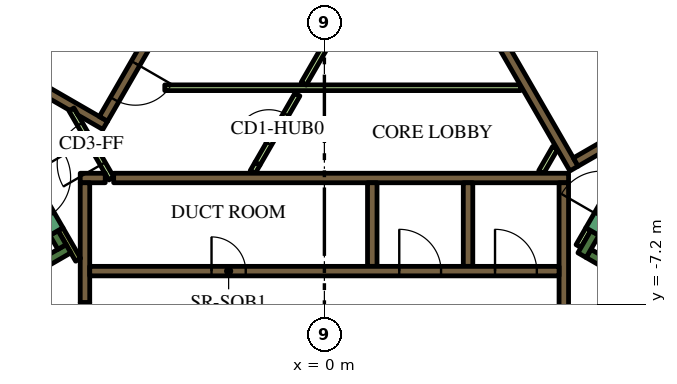
"""IFC4 building model, lengths in metres.
Left out: names, types, materials, properties, quantities, classifications, styles, units other than length and angle.
Written with IfcOpenShell. Run it as: python <this file> out.ifc"""

import sys

from ifc_helpers import new_model, si_unit, direction, frame, frame_2d, origin, place, context, subcontext, project, spatial, polyline, rectangle, outline, extrude, element, fill, save


model = new_model("IFC4")
c1 = context("Model", 3, precision=1e-05, world=origin(), true_north=direction((0.0, 1.0)))
c2 = subcontext(c1, "Body", "Model", "MODEL_VIEW")
j1 = project(units=[si_unit("LENGTHUNIT", "METRE"), si_unit("PLANEANGLEUNIT", "RADIAN")], contexts=[c1])
p1 = place(None, origin())
s1 = spatial("IfcSite", under=j1, at=p1, CompositionType="ELEMENT")
p2 = place(p1, origin())
s2 = spatial("IfcBuilding", under=s1, at=p2, CompositionType="ELEMENT")
p3 = place(p2, frame((0.0, 0.0, 95.4)))
s3 = spatial("IfcBuildingStorey", under=s2, at=p3, CompositionType="ELEMENT", Elevation=95.4)
p4 = place(p3, frame((6.776, 13.364, 0.0), z_axis=(0.0, 0.0, 1.0), x_axis=(0.500004177138, -0.8660229921, 0.0)))
e1 = element("IfcWall", 1, at=p4, inside=s3, PredefinedType="SOLIDWALL", context=c2, shape_type="SweptSolid", body=[
    extrude(rectangle(XDim=20.204, YDim=0.9, at=frame_2d((10.102, 0.0))), origin(), (0.0, 0.0, 1.0), 3.9),
])
p5 = place(p3, frame((-15.36, -1.503, 0.0), z_axis=(0.0, 0.0, 1.0), x_axis=(0.50000389221, 0.866023156604, 0.0)))
e2 = element("IfcWall", 2, at=p5, inside=s3, PredefinedType="SOLIDWALL", context=c2, shape_type="SweptSolid", body=[
    extrude(rectangle(XDim=21.0, YDim=0.9, at=frame_2d((10.5, 0.0))), origin(), (0.0, 0.0, 1.0), 3.9),
])
p6 = place(p3, frame((12.84, -9.261, 0.0), z_axis=(0.0, 0.0, 1.0), x_axis=(-0.866013990052, 0.500019768644, 0.0)))
e3 = element("IfcWall", 3, at=p6, inside=s3, PredefinedType="SOLIDWALL", context=c2, shape_type="SweptSolid", body=[
    extrude(rectangle(XDim=6.8, YDim=0.25, at=frame_2d((3.4, 0.0))), origin(), (0.0, 0.0, 1.0), 3.9),
])
p7 = place(p3, frame((6.78, -5.906, 0.0), z_axis=(0.0, 0.0, 1.0), x_axis=(0.500223362819, 0.865896406789, 0.0)))
e4 = element("IfcWall", 4, at=p7, inside=s3, PredefinedType="SOLIDWALL", context=c2, shape_type="SweptSolid", body=[
    extrude(rectangle(XDim=0.675, YDim=0.25, at=frame_2d((0.337, 0.0))), origin(), (0.0, 0.0, 1.0), 3.9),
])
p8 = place(p3, frame((-12.84, -9.261, 0.0), z_axis=(0.0, 0.0, 1.0), x_axis=(0.866016039709, 0.500016218704, 0.0)))
e5 = element("IfcWall", 5, at=p8, inside=s3, PredefinedType="SOLIDWALL", context=c2, shape_type="SweptSolid", body=[
    extrude(rectangle(XDim=7.05, YDim=0.25, at=frame_2d((3.525, 0.0))), origin(), (0.0, 0.0, 1.0), 3.9),
])
p9 = place(p3, frame((-6.905, -5.69, 0.0), z_axis=(0.0, 0.0, 1.0), x_axis=(-0.500402024738, 0.865793170242, 0.0)))
e6 = element("IfcWall", 6, at=p9, inside=s3, PredefinedType="SOLIDWALL", context=c2, shape_type="SweptSolid", body=[
    extrude(rectangle(XDim=0.425, YDim=0.25, at=frame_2d((0.212, 0.0))), origin(), (0.0, 0.0, 1.0), 3.9),
])
p10 = place(p3, frame((-5.545, -3.875, 0.0), z_axis=(0.0, 0.0, 1.0), x_axis=(1.0, 0.0, 0.0)))
e7 = element("IfcWall", 7, at=p10, inside=s3, PredefinedType="SOLIDWALL", context=c2, shape_type="SweptSolid", body=[
    extrude(rectangle(XDim=11.97, YDim=0.25, at=frame_2d((5.985, 0.0))), origin(), (0.0, 0.0, 1.0), 3.9),
])
p11 = place(p3, frame((-6.425, -3.875, 0.0), z_axis=(0.0, 0.0, 1.0), x_axis=(1.0, 0.0, 0.0)))
e8 = element("IfcWall", 8, at=p11, inside=s3, PredefinedType="SOLIDWALL", context=c2, shape_type="SweptSolid", body=[
    extrude(rectangle(XDim=0.658, YDim=0.25, at=frame_2d((0.329, 0.0))), origin(), (0.0, 0.0, 1.0), 3.9),
])
p12 = place(p3, frame((6.3, -7.268, 0.0), z_axis=(0.0, 0.0, 1.0), x_axis=(0.0, 1.0, 0.0)))
e9 = element("IfcWall", 9, at=p12, inside=s3, PredefinedType="SOLIDWALL", context=c2, shape_type="SweptSolid", body=[
    extrude(rectangle(XDim=3.268, YDim=0.25, at=frame_2d((1.634, 0.0))), origin(), (0.0, 0.0, 1.0), 3.9),
])
for number, where, z_axis, x_axis in (
    (10, (3.78, -4.0, 0.0), (0.0, 0.0, 1.0), (0.0, -1.0, 0.0)),
    (11, (1.26, -4.0, 0.0), (0.0, 0.0, 1.0), (0.0, -1.0, 0.0)),
):
    element("IfcWall", number, at=place(p3, frame(where, z_axis=z_axis, x_axis=x_axis)), inside=s3, PredefinedType="SOLIDWALL", context=c2, shape_type="SweptSolid", body=[
        extrude(rectangle(XDim=2.2, YDim=0.25, at=frame_2d((1.1, 0.0))), origin(), (0.0, 0.0, 1.0), 3.9),
    ])
p13 = place(p3, frame((-6.3, -4.0, 0.0), z_axis=(0.0, 0.0, 1.0), x_axis=(0.0, -1.0, 0.0)))
e12 = element("IfcWall", 12, at=p13, inside=s3, PredefinedType="SOLIDWALL", context=c2, shape_type="SweptSolid", body=[
    extrude(rectangle(XDim=3.154, YDim=0.25, at=frame_2d((1.577, 0.0))), origin(), (0.0, 0.0, 1.0), 3.9),
])
p14 = place(p3, origin())
e13 = element("IfcWall", 13, at=p14, inside=s3, PredefinedType="SOLIDWALL", context=c2, shape_type="SweptSolid", body=[
    extrude(outline(polyline([(0.566, 6.725), (0.566, 6.875), (0.566, 6.875), (0.565, 6.875), (0.361, 6.875), (0.035, 7.439), (0.252, 7.564), (0.377, 7.348), (6.552, -3.348), (6.677, -3.564), (6.46, -3.689), (0.448, 6.725), (0.565, 6.725), (0.566, 6.725), (0.566, 6.725)])), origin(), (0.0, 0.0, 1.0), 3.9),
])
p15 = place(p3, frame((6.614, -3.456, 0.0), z_axis=(0.0, 0.0, 1.0), x_axis=(0.866031582473, 0.499989298045, 0.0)))
e14 = element("IfcWall", 14, at=p15, inside=s3, PredefinedType="SOLIDWALL", context=c2, shape_type="SweptSolid", body=[
    extrude(rectangle(XDim=2.455, YDim=0.25, at=frame_2d((1.228, 0.0))), origin(), (0.0, 0.0, 1.0), 3.9),
])
p16 = place(p3, frame((-8.06, -1.311, 0.0), z_axis=(0.0, 0.0, 1.0), x_axis=(0.50000273126, 0.866023826885, 0.0)))
e15 = element("IfcWall", 15, at=p16, inside=s3, PredefinedType="SOLIDWALL", context=c2, shape_type="SweptSolid", body=[
    extrude(rectangle(XDim=10.33, YDim=0.25, at=frame_2d((5.165, 0.0))), origin(), (0.0, 0.0, 1.0), 3.9),
])
e16 = element("IfcWall", 16, at=p14, inside=s3, PredefinedType="SOLIDWALL", context=c2, shape_type="SweptSolid", body=[
    extrude(outline(polyline([(-5.922, -2.257), (-5.922, -2.257), (-5.705, -2.382), (-5.83, -2.598), (-6.483, -2.221), (-6.591, -2.033), (-6.591, -2.033), (-6.7, -2.096), (-7.952, -1.373), (-7.827, -1.156), (-5.922, -2.257)])), origin(), (0.0, 0.0, 1.0), 3.9),
])
p17 = place(p3, frame((-6.48, -6.027, 0.0), z_axis=(0.0, 0.0, 1.0), x_axis=(-0.499927229454, 0.866067413802, 0.0)))
e17 = element("IfcWall", 17, at=p17, inside=s3, PredefinedType="PARTITIONING", context=c2, shape_type="SweptSolid", body=[
    extrude(rectangle(XDim=0.929, YDim=0.15, at=frame_2d((0.464, 0.0))), origin(), (0.0, 0.0, 1.0), 3.9),
])
p18 = place(p3, frame((-1.887, -3.718, 0.0), z_axis=(0.0, 0.0, 1.0), x_axis=(0.500165633897, 0.865929753888, 0.0)))
e18 = element("IfcWall", 18, at=p18, inside=s3, PredefinedType="PARTITIONING", context=c2, shape_type="SweptSolid", body=[
    extrude(rectangle(XDim=0.254, YDim=0.15, at=frame_2d((0.127, 0.0))), origin(), (0.0, 0.0, 1.0), 2.75),
])
p19 = place(p3, frame((6.945, -5.222, 0.0), z_axis=(0.0, 0.0, 1.0), x_axis=(-0.499818422106, -0.866130212453, 0.0)))
e19 = element("IfcWall", 19, at=p19, inside=s3, PredefinedType="PARTITIONING", context=c2, shape_type="SweptSolid", body=[
    extrude(rectangle(XDim=0.514, YDim=0.15, at=frame_2d((0.257, 0.0))), origin(), (0.0, 0.0, 1.0), 2.75),
])
p20 = place(p3, frame((5.705, -3.718, 0.0), z_axis=(0.0, 0.0, 1.0), x_axis=(0.499962090823, 0.866047289552, 0.0)))
e20 = element("IfcWall", 20, at=p20, inside=s3, PredefinedType="PARTITIONING", context=c2, shape_type="SweptSolid", body=[
    extrude(rectangle(XDim=0.735, YDim=0.15, at=frame_2d((0.367, 0.0))), origin(), (0.0, 0.0, 1.0), 2.75),
])
p21 = place(p3, frame((-4.2, -1.5, 0.0), z_axis=(0.0, 0.0, 1.0), x_axis=(1.0, 0.0, 0.0)))
e21 = element("IfcWall", 21, at=p21, inside=s3, PredefinedType="PARTITIONING", context=c2, shape_type="SweptSolid", body=[
    extrude(rectangle(XDim=9.359, YDim=0.15, at=frame_2d((4.68, 0.0))), origin(), (0.0, 0.0, 1.0), 2.75),
])
p22 = place(p3, frame((-0.544, -1.393, 0.0), z_axis=(0.0, 0.0, 1.0), x_axis=(0.499928740635, 0.866066541489, 0.0)))
e22 = element("IfcWall", 22, at=p22, inside=s3, PredefinedType="PARTITIONING", context=c2, shape_type="SweptSolid", body=[
    extrude(rectangle(XDim=1.912, YDim=0.15, at=frame_2d((0.956, 0.0))), origin(), (0.0, 0.0, 1.0), 2.75),
])
p23 = place(p3, frame((-6.175, -6.325, 0.0), z_axis=(0.0, 0.0, 1.0), x_axis=(1.0, 0.0, 0.0)))
e23 = element("IfcWall", 23, at=p23, inside=s3, PredefinedType="SOLIDWALL", context=c2, shape_type="SweptSolid", body=[
    extrude(rectangle(XDim=12.35, YDim=0.25, at=frame_2d((6.175, 0.0))), origin(), (0.0, 0.0, 1.0), 3.9),
])
p24 = place(p23, frame((3.205, 0.0, 0.0)))
e24 = element("IfcOpeningElement", 24, at=p24, cuts=e23, PredefinedType="OPENING", context=c2, shape_type="SweptSolid", body=[
    extrude(rectangle(XDim=0.9, YDim=2.1, at=frame_2d((0.45, 1.05))), frame((0.0, 0.135, 0.0), z_axis=(0.0, -1.0, 0.0), x_axis=(1.0, 0.0, 0.0)), (0.0, 0.0, 1.0), 0.27),
])
p25 = place(p23, frame((8.145, 0.0, 0.0)))
e25 = element("IfcOpeningElement", 25, at=p25, cuts=e23, PredefinedType="OPENING", context=c2, shape_type="SweptSolid", body=[
    extrude(rectangle(XDim=1.1, YDim=2.1, at=frame_2d((0.55, 1.05))), frame((0.0, 0.135, 0.0), z_axis=(0.0, -1.0, 0.0), x_axis=(1.0, 0.0, 0.0)), (0.0, 0.0, 1.0), 0.27),
])
p26 = place(p23, frame((10.665, 0.0, 0.0)))
e26 = element("IfcOpeningElement", 26, at=p26, cuts=e23, PredefinedType="OPENING", context=c2, shape_type="SweptSolid", body=[
    extrude(rectangle(XDim=1.1, YDim=2.1, at=frame_2d((0.55, 1.05))), frame((0.0, 0.135, 0.0), z_axis=(0.0, -1.0, 0.0), x_axis=(1.0, 0.0, 0.0)), (0.0, 0.0, 1.0), 0.27),
])
p27 = place(p3, frame((8.565, -2.185, 0.0), z_axis=(0.0, 0.0, 1.0), x_axis=(-0.499997954832, 0.866026584559, 0.0)))
e27 = element("IfcWall", 27, at=p27, inside=s3, PredefinedType="SOLIDWALL", context=c2, shape_type="SweptSolid", body=[
    extrude(rectangle(XDim=12.35, YDim=0.25, at=frame_2d((6.175, 0.0))), origin(), (0.0, 0.0, 1.0), 3.9),
])
p28 = place(p27, frame((5.725, 0.0, 0.0)))
e28 = element("IfcOpeningElement", 28, at=p28, cuts=e27, PredefinedType="OPENING", context=c2, shape_type="SweptSolid", body=[
    extrude(rectangle(XDim=0.9, YDim=2.1, at=frame_2d((0.45, 1.05))), frame((0.0, 0.135, 0.0), z_axis=(0.0, -1.0, 0.0), x_axis=(1.0, 0.0, 0.0)), (0.0, 0.0, 1.0), 0.27),
])
p29 = place(p3, frame((-0.898, 6.194, 0.0), z_axis=(0.0, 0.0, 1.0), x_axis=(-0.499996202215, -0.866027596426, 0.0)))
e29 = element("IfcWall", 29, at=p29, inside=s3, PredefinedType="SOLIDWALL", context=c2, shape_type="SweptSolid", body=[
    extrude(rectangle(XDim=9.83, YDim=0.25, at=frame_2d((4.915, 0.0))), origin(), (0.0, 0.0, 1.0), 3.9),
])
p30 = place(p29, frame((0.585, 0.0, 0.0)))
e30 = element("IfcOpeningElement", 30, at=p30, cuts=e29, PredefinedType="OPENING", context=c2, shape_type="SweptSolid", body=[
    extrude(rectangle(XDim=1.1, YDim=2.1, at=frame_2d((0.55, 1.05))), frame((0.0, 0.135, 0.0), z_axis=(0.0, -1.0, 0.0), x_axis=(1.0, 0.0, 0.0)), (0.0, 0.0, 1.0), 0.27),
])
p31 = place(p29, frame((3.105, 0.0, 0.0)))
e31 = element("IfcOpeningElement", 31, at=p31, cuts=e29, PredefinedType="OPENING", context=c2, shape_type="SweptSolid", body=[
    extrude(rectangle(XDim=1.1, YDim=2.1, at=frame_2d((0.55, 1.05))), frame((0.0, 0.135, 0.0), z_axis=(0.0, -1.0, 0.0), x_axis=(1.0, 0.0, 0.0)), (0.0, 0.0, 1.0), 0.27),
])
p32 = place(p29, frame((5.625, 0.0, 0.0)))
e32 = element("IfcOpeningElement", 32, at=p32, cuts=e29, PredefinedType="OPENING", context=c2, shape_type="SweptSolid", body=[
    extrude(rectangle(XDim=1.1, YDim=2.1, at=frame_2d((0.55, 1.05))), frame((0.0, 0.135, 0.0), z_axis=(0.0, -1.0, 0.0), x_axis=(1.0, 0.0, 0.0)), (0.0, 0.0, 1.0), 0.27),
])
p33 = place(p29, frame((8.145, 0.0, 0.0)))
e33 = element("IfcOpeningElement", 33, at=p33, cuts=e29, PredefinedType="OPENING", context=c2, shape_type="SweptSolid", body=[
    extrude(rectangle(XDim=1.1, YDim=2.1, at=frame_2d((0.55, 1.05))), frame((0.0, 0.135, 0.0), z_axis=(0.0, -1.0, 0.0), x_axis=(1.0, 0.0, 0.0)), (0.0, 0.0, 1.0), 0.27),
])
p34 = place(p3, frame((7.053, -5.284, 0.0), z_axis=(0.0, 0.0, 1.0), x_axis=(0.500078061341, 0.865980330357, 0.0)))
e34 = element("IfcWall", 34, at=p34, inside=s3, PredefinedType="SOLIDWALL", context=c2, shape_type="SweptSolid", body=[
    extrude(rectangle(XDim=2.1, YDim=0.4, at=frame_2d((1.05, 0.0))), origin(), (0.0, 0.0, 1.0), 3.9),
])
p35 = place(p34, frame((0.45, 0.0, 0.0)))
e35 = element("IfcOpeningElement", 35, at=p35, cuts=e34, PredefinedType="OPENING", context=c2, shape_type="SweptSolid", body=[
    extrude(rectangle(XDim=1.2, YDim=2.1, at=frame_2d((0.6, 1.05))), frame((0.0, 0.21, 0.0), z_axis=(0.0, -1.0, 0.0), x_axis=(1.0, 0.0, 0.0)), (0.0, 0.0, 1.0), 0.42),
])
p36 = place(p3, frame((-8.103, -3.466, 0.0), z_axis=(0.0, 0.0, 1.0), x_axis=(0.500078061341, -0.865980330357, 0.0)))
e36 = element("IfcWall", 36, at=p36, inside=s3, PredefinedType="SOLIDWALL", context=c2, shape_type="SweptSolid", body=[
    extrude(rectangle(XDim=2.1, YDim=0.4, at=frame_2d((1.05, 0.0))), origin(), (0.0, 0.0, 1.0), 3.9),
])
p37 = place(p36, frame((0.45, 0.0, 0.0)))
e37 = element("IfcOpeningElement", 37, at=p37, cuts=e36, PredefinedType="OPENING", context=c2, shape_type="SweptSolid", body=[
    extrude(rectangle(XDim=1.2, YDim=2.1, at=frame_2d((0.6, 1.05))), frame((0.0, 0.21, 0.0), z_axis=(0.0, -1.0, 0.0), x_axis=(1.0, 0.0, 0.0)), (0.0, 0.0, 1.0), 0.42),
])
p38 = place(p3, frame((-6.3, -7.154, 0.0), z_axis=(0.0, 0.0, 1.0), x_axis=(0.0, -1.0, 0.0)))
e38 = element("IfcWall", 38, at=p38, inside=s3, PredefinedType="SOLIDWALL", context=c2, shape_type="SweptSolid", body=[
    extrude(rectangle(XDim=1.8, YDim=0.25, at=frame_2d((0.9, 0.0))), origin(), (0.0, 0.0, 1.0), 3.9),
])
p39 = place(p38, frame((0.45, 0.0, 0.0)))
e39 = element("IfcOpeningElement", 39, at=p39, cuts=e38, PredefinedType="OPENING", context=c2, shape_type="SweptSolid", body=[
    extrude(rectangle(XDim=0.9, YDim=2.1, at=frame_2d((0.45, 1.05))), frame((0.0, 0.135, 0.0), z_axis=(0.0, -1.0, 0.0), x_axis=(1.0, 0.0, 0.0)), (0.0, 0.0, 1.0), 0.27),
])
p40 = place(p3, frame((-1.76, -3.498, 0.0), z_axis=(0.0, 0.0, 1.0), x_axis=(0.499977374825, 0.866038466041, 0.0)))
e40 = element("IfcWall", 40, at=p40, inside=s3, PredefinedType="PARTITIONING", context=c2, shape_type="SweptSolid", body=[
    extrude(rectangle(XDim=2.1, YDim=0.15, at=frame_2d((1.05, 0.0))), origin(), (0.0, 0.0, 1.0), 2.75),
])
p41 = place(p40, frame((0.6, 0.0, 0.0)))
e41 = element("IfcOpeningElement", 41, at=p41, cuts=e40, PredefinedType="OPENING", context=c2, shape_type="SweptSolid", body=[
    extrude(rectangle(XDim=0.9, YDim=2.1, at=frame_2d((0.45, 1.05))), frame((0.0, 0.085, 0.0), z_axis=(0.0, -1.0, 0.0), x_axis=(1.0, 0.0, 0.0)), (0.0, 0.0, 1.0), 0.17),
])
p42 = place(p3, frame((-5.606, -3.89, 0.0), z_axis=(0.0, 0.0, 1.0), x_axis=(-0.500027713859, 0.866009402589, 0.0)))
e42 = element("IfcWall", 42, at=p42, inside=s3, PredefinedType="PARTITIONING", context=c2, shape_type="SweptSolid", body=[
    extrude(rectangle(XDim=2.1, YDim=0.15, at=frame_2d((1.05, 0.0))), origin(), (0.0, 0.0, 1.0), 2.75),
])
p43 = place(p42, frame((0.45, 0.0, 0.0)))
e43 = element("IfcOpeningElement", 43, at=p43, cuts=e42, PredefinedType="OPENING", context=c2, shape_type="SweptSolid", body=[
    extrude(rectangle(XDim=1.2, YDim=2.1, at=frame_2d((0.6, 1.05))), frame((0.0, 0.085, 0.0), z_axis=(0.0, -1.0, 0.0), x_axis=(1.0, 0.0, 0.0)), (0.0, 0.0, 1.0), 0.17),
])
p44 = place(p3, frame((6.163, 18.475, 0.0), z_axis=(0.0, 0.0, 1.0), x_axis=(0.500001317485, -0.866024643133, 0.0)))
e44 = element("IfcWall", 44, at=p44, inside=s3, PredefinedType="PARTITIONING", context=c2, shape_type="SweptSolid", body=[
    extrude(rectangle(XDim=25.767, YDim=0.15, at=frame_2d((12.883, 0.0))), origin(), (0.0, 0.0, 1.0), 2.75),
])
p45 = place(p44, frame((24.241, 0.0, 0.0)))
e45 = element("IfcOpeningElement", 45, at=p45, cuts=e44, PredefinedType="OPENING", context=c2, shape_type="SweptSolid", body=[
    extrude(rectangle(XDim=1.0, YDim=2.1, at=frame_2d((0.5, 1.05))), frame((0.0, 0.085, 0.0), z_axis=(0.0, -1.0, 0.0), x_axis=(1.0, 0.0, 0.0)), (0.0, 0.0, 1.0), 0.17),
])
p46 = place(p44, frame((13.144, 0.0, 0.0)))
e46 = element("IfcOpeningElement", 46, at=p46, cuts=e44, PredefinedType="OPENING", context=c2, shape_type="SweptSolid", body=[
    extrude(rectangle(XDim=1.0, YDim=2.1, at=frame_2d((0.5, 1.05))), frame((0.0, 0.085, 0.0), z_axis=(0.0, -1.0, 0.0), x_axis=(1.0, 0.0, 0.0)), (0.0, 0.0, 1.0), 0.17),
])
p47 = place(p44, frame((11.592, 0.0, 0.0)))
e47 = element("IfcOpeningElement", 47, at=p47, cuts=e44, PredefinedType="OPENING", context=c2, shape_type="SweptSolid", body=[
    extrude(rectangle(XDim=1.1, YDim=2.1, at=frame_2d((0.55, 1.05))), frame((0.0, 0.085, 0.0), z_axis=(0.0, -1.0, 0.0), x_axis=(1.0, 0.0, 0.0)), (0.0, 0.0, 1.0), 0.17),
])
p48 = place(p44, frame((4.674, 0.0, 0.0)))
e48 = element("IfcOpeningElement", 48, at=p48, cuts=e44, PredefinedType="OPENING", context=c2, shape_type="SweptSolid", body=[
    extrude(rectangle(XDim=0.9, YDim=2.1, at=frame_2d((0.45, 1.05))), frame((0.0, 0.085, 0.0), z_axis=(0.0, -1.0, 0.0), x_axis=(1.0, 0.0, 0.0)), (0.0, 0.0, 1.0), 0.17),
])
p49 = place(p44, frame((2.411, 0.0, 0.0)))
e49 = element("IfcOpeningElement", 49, at=p49, cuts=e44, PredefinedType="OPENING", context=c2, shape_type="SweptSolid", body=[
    extrude(rectangle(XDim=1.0, YDim=2.1, at=frame_2d((0.5, 1.05))), frame((0.0, 0.085, 0.0), z_axis=(0.0, -1.0, 0.0), x_axis=(1.0, 0.0, 0.0)), (0.0, 0.0, 1.0), 0.17),
])
p50 = place(p3, frame((-19.081, -3.9, 0.0), z_axis=(0.0, 0.0, 1.0), x_axis=(0.499998313975, 0.866026377209, 0.0)))
e50 = element("IfcWall", 50, at=p50, inside=s3, PredefinedType="PARTITIONING", context=c2, shape_type="SweptSolid", body=[
    extrude(rectangle(XDim=25.766, YDim=0.15, at=frame_2d((12.883, 0.0))), origin(), (0.0, 0.0, 1.0), 2.75),
])
p51 = place(p50, frame((19.306, 0.0, 0.0)))
e51 = element("IfcOpeningElement", 51, at=p51, cuts=e50, PredefinedType="OPENING", context=c2, shape_type="SweptSolid", body=[
    extrude(rectangle(XDim=1.0, YDim=2.1, at=frame_2d((0.5, 1.05))), frame((0.0, 0.085, 0.0), z_axis=(0.0, -1.0, 0.0), x_axis=(1.0, 0.0, 0.0)), (0.0, 0.0, 1.0), 0.17),
])
p52 = place(p50, frame((17.144, 0.0, 0.0)))
e52 = element("IfcOpeningElement", 52, at=p52, cuts=e50, PredefinedType="OPENING", context=c2, shape_type="SweptSolid", body=[
    extrude(rectangle(XDim=0.9, YDim=2.1, at=frame_2d((0.45, 1.05))), frame((0.0, 0.085, 0.0), z_axis=(0.0, -1.0, 0.0), x_axis=(1.0, 0.0, 0.0)), (0.0, 0.0, 1.0), 0.17),
])
p53 = place(p50, frame((9.955, 0.0, 0.0)))
e53 = element("IfcOpeningElement", 53, at=p53, cuts=e50, PredefinedType="OPENING", context=c2, shape_type="SweptSolid", body=[
    extrude(rectangle(XDim=1.1, YDim=2.1, at=frame_2d((0.55, 1.05))), frame((0.0, 0.085, 0.0), z_axis=(0.0, -1.0, 0.0), x_axis=(1.0, 0.0, 0.0)), (0.0, 0.0, 1.0), 0.17),
])
p54 = place(p50, frame((8.648, 0.0, 0.0)))
e54 = element("IfcOpeningElement", 54, at=p54, cuts=e50, PredefinedType="OPENING", context=c2, shape_type="SweptSolid", body=[
    extrude(rectangle(XDim=1.0, YDim=2.1, at=frame_2d((0.5, 1.05))), frame((0.0, 0.085, 0.0), z_axis=(0.0, -1.0, 0.0), x_axis=(1.0, 0.0, 0.0)), (0.0, 0.0, 1.0), 0.17),
])
p55 = place(p50, frame((1.553, 0.0, 0.0)))
e55 = element("IfcOpeningElement", 55, at=p55, cuts=e50, PredefinedType="OPENING", context=c2, shape_type="SweptSolid", body=[
    extrude(rectangle(XDim=0.9, YDim=2.1, at=frame_2d((0.45, 1.05))), frame((0.0, 0.085, 0.0), z_axis=(0.0, -1.0, 0.0), x_axis=(1.0, 0.0, 0.0)), (0.0, 0.0, 1.0), 0.17),
])
p56 = place(p24, origin())
e56 = element("IfcDoor", 56, at=p56, inside=s3, OperationType="SINGLE_SWING_LEFT", PredefinedType="DOOR", context=c2, shape_type="SweptSolid", body=[
    extrude(rectangle(XDim=0.9, YDim=2.1, at=frame_2d((0.45, 1.05))), frame((0.0, 0.025, 0.0), z_axis=(0.0, -1.0, 0.0), x_axis=(1.0, 0.0, 0.0)), (0.0, 0.0, 1.0), 0.05),
])
fill(e24, e56)
p57 = place(p25, origin())
e57 = element("IfcDoor", 57, at=p57, inside=s3, OperationType="DOUBLE_DOOR_SLIDING", PredefinedType="DOOR", context=c2, shape_type="SweptSolid", body=[
    extrude(rectangle(XDim=1.1, YDim=2.1, at=frame_2d((0.55, 1.05))), frame((0.0, 0.025, 0.0), z_axis=(0.0, -1.0, 0.0), x_axis=(1.0, 0.0, 0.0)), (0.0, 0.0, 1.0), 0.05),
])
fill(e25, e57)
p58 = place(p26, origin())
e58 = element("IfcDoor", 58, at=p58, inside=s3, OperationType="DOUBLE_DOOR_SLIDING", PredefinedType="DOOR", context=c2, shape_type="SweptSolid", body=[
    extrude(rectangle(XDim=1.1, YDim=2.1, at=frame_2d((0.55, 1.05))), frame((0.0, 0.025, 0.0), z_axis=(0.0, -1.0, 0.0), x_axis=(1.0, 0.0, 0.0)), (0.0, 0.0, 1.0), 0.05),
])
fill(e26, e58)
p59 = place(p33, origin())
e59 = element("IfcDoor", 59, at=p59, inside=s3, OperationType="DOUBLE_DOOR_SLIDING", PredefinedType="DOOR", context=c2, shape_type="SweptSolid", body=[
    extrude(rectangle(XDim=1.1, YDim=2.1, at=frame_2d((0.55, 1.05))), frame((0.0, 0.025, 0.0), z_axis=(0.0, -1.0, 0.0), x_axis=(1.0, 0.0, 0.0)), (0.0, 0.0, 1.0), 0.05),
])
fill(e33, e59)
p60 = place(p41, origin())
e60 = element("IfcDoor", 60, at=p60, inside=s3, OperationType="SINGLE_SWING_LEFT", PredefinedType="DOOR", context=c2, shape_type="SweptSolid", body=[
    extrude(rectangle(XDim=0.9, YDim=2.1, at=frame_2d((0.45, 1.05))), frame((0.0, 0.025, 0.0), z_axis=(0.0, -1.0, 0.0), x_axis=(1.0, 0.0, 0.0)), (0.0, 0.0, 1.0), 0.05),
])
fill(e41, e60)
p61 = place(p43, origin())
e61 = element("IfcDoor", 61, at=p61, inside=s3, OperationType="SINGLE_SWING_LEFT", PredefinedType="DOOR", context=c2, shape_type="SweptSolid", body=[
    extrude(rectangle(XDim=1.2, YDim=2.1, at=frame_2d((0.6, 1.05))), frame((0.0, 0.025, 0.0), z_axis=(0.0, -1.0, 0.0), x_axis=(1.0, 0.0, 0.0)), (0.0, 0.0, 1.0), 0.05),
])
fill(e43, e61)
save(model, sys.argv[1])
